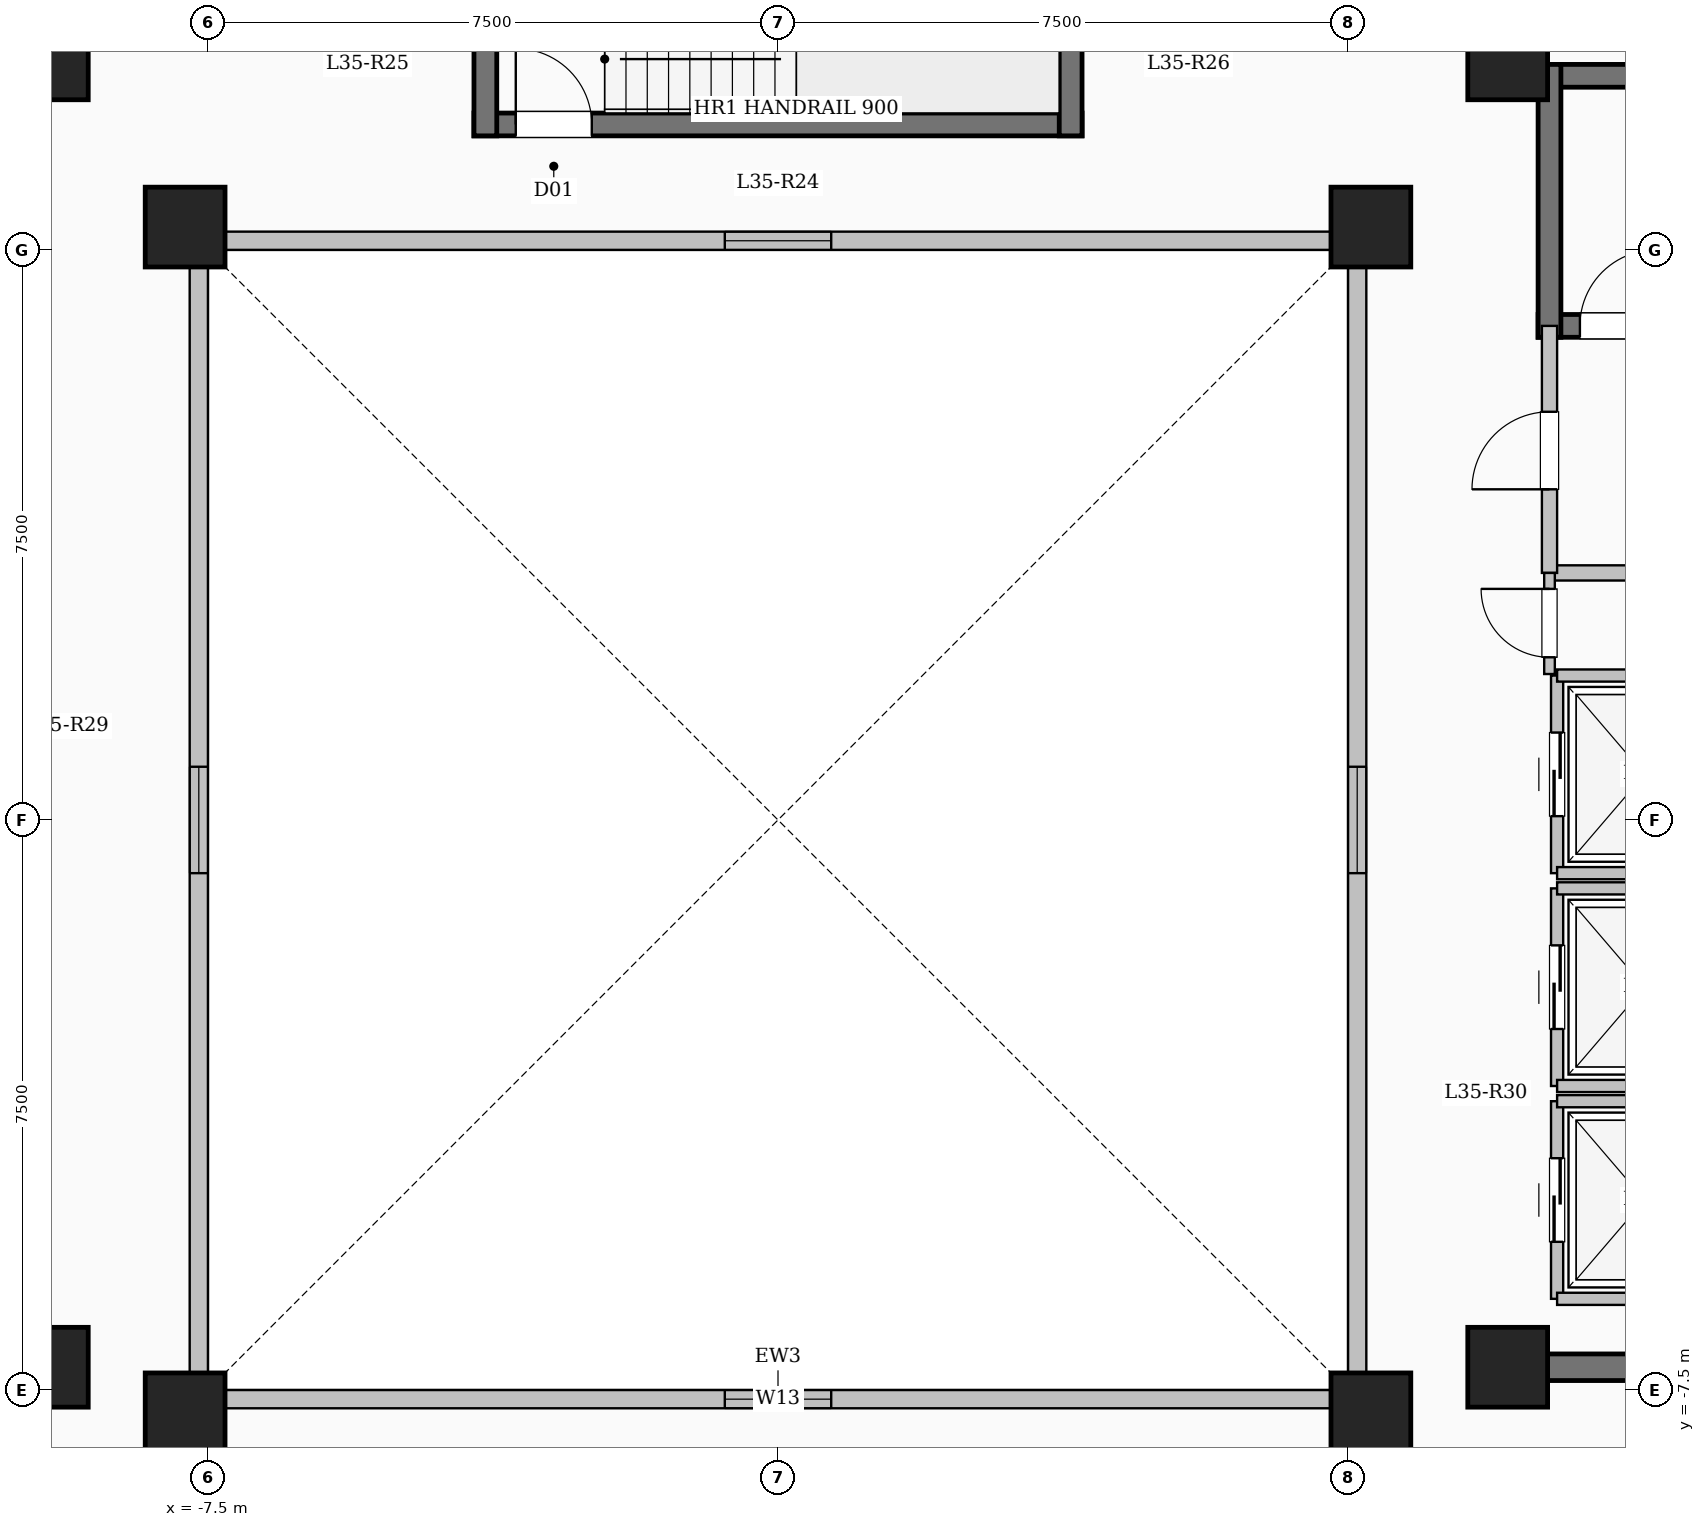
"""IFC4 building model, lengths in metres.
Left out: names, types, materials, properties, quantities, classifications, styles, units other than length and angle.
Written with IfcOpenShell. Run it as: python <this file> out.ifc"""

import sys

from ifc_helpers import new_model, si_unit, direction, frame, frame_2d, origin, origin_2d, place, context, subcontext, project, spatial, rectangle, extrude, element, fill, save


model = new_model("IFC4")
c1 = context("Model", 3, precision=1e-05, world=origin(), true_north=direction((0.0, 1.0)))
c2 = subcontext(c1, "Body", "Model", "MODEL_VIEW")
j1 = project(units=[si_unit("LENGTHUNIT", "METRE"), si_unit("PLANEANGLEUNIT", "RADIAN")], contexts=[c1])
p1 = place(None, origin())
s1 = spatial("IfcSite", under=j1, at=p1, CompositionType="ELEMENT")
p2 = place(p1, origin())
s2 = spatial("IfcBuilding", under=s1, at=p2, CompositionType="ELEMENT")
p3 = place(p2, frame((0.0, 0.0, 132.6)))
s3 = spatial("IfcBuildingStorey", under=s2, at=p3, CompositionType="ELEMENT", Elevation=132.6)
for number, where, z_axis, x_axis in (
    (1, (-7.8, -7.8, 0.0), (0.0, 0.0, 1.0), (1.0, 0.0, 0.0)),
    (2, (7.8, -7.8, 0.0), (0.0, 0.0, 1.0), (1.0, 0.0, 0.0)),
    (3, (-7.8, 7.8, 0.0), (0.0, 0.0, 1.0), (1.0, 0.0, 0.0)),
    (4, (7.8, 7.8, 0.0), (0.0, 0.0, 1.0), (1.0, 0.0, 0.0)),
    (5, (-9.6, -7.2, 0.0), (0.0, 0.0, 1.0), (1.0, 0.0, 0.0)),
    (6, (-9.6, 10.0, 0.0), (0.0, 0.0, 1.0), (1.0, 0.0, 0.0)),
    (7, (9.6, -7.2, 0.0), (0.0, 0.0, 1.0), (1.0, 0.0, 0.0)),
    (8, (9.6, 10.0, 0.0), (0.0, 0.0, 1.0), (1.0, 0.0, 0.0)),
):
    element("IfcColumn", number, at=place(p3, frame(where, z_axis=z_axis, x_axis=x_axis)), inside=s3, PredefinedType="COLUMN", context=c2, shape_type="SweptSolid", body=[
        extrude(rectangle(XDim=1.05, YDim=1.05, at=origin_2d()), origin(), (0.0, 0.0, 1.0), 3.35),
    ])
p4 = place(p3, frame((-7.62, -7.62, 0.0), z_axis=(0.0, 0.0, 1.0), x_axis=(1.0, 0.0, 0.0)))
e9 = element("IfcWall", 9, at=p4, inside=s3, PredefinedType="SOLIDWALL", context=c2, shape_type="SweptSolid", body=[
    extrude(rectangle(XDim=15.24, YDim=0.24, at=frame_2d((7.62, 0.0))), origin(), (0.0, 0.0, 1.0), 3.1),
])
p5 = place(p4, frame((6.92, 0.0, 0.95)))
e10 = element("IfcOpeningElement", 10, at=p5, cuts=e9, PredefinedType="OPENING", context=c2, shape_type="SweptSolid", body=[
    extrude(rectangle(XDim=1.4, YDim=1.5, at=frame_2d((0.7, 0.75))), frame((0.0, 0.13, 0.0), z_axis=(0.0, -1.0, 0.0), x_axis=(1.0, 0.0, 0.0)), (0.0, 0.0, 1.0), 0.26),
])
p6 = place(p3, frame((7.62, -7.62, 0.0), z_axis=(0.0, 0.0, 1.0), x_axis=(0.0, 1.0, 0.0)))
e11 = element("IfcWall", 11, at=p6, inside=s3, PredefinedType="SOLIDWALL", context=c2, shape_type="SweptSolid", body=[
    extrude(rectangle(XDim=15.24, YDim=0.24, at=frame_2d((7.62, 0.0))), origin(), (0.0, 0.0, 1.0), 3.1),
])
p7 = place(p6, frame((6.92, 0.0, 0.95)))
e12 = element("IfcOpeningElement", 12, at=p7, cuts=e11, PredefinedType="OPENING", context=c2, shape_type="SweptSolid", body=[
    extrude(rectangle(XDim=1.4, YDim=1.5, at=frame_2d((0.7, 0.75))), frame((0.0, 0.13, 0.0), z_axis=(0.0, -1.0, 0.0), x_axis=(1.0, 0.0, 0.0)), (0.0, 0.0, 1.0), 0.26),
])
p8 = place(p3, frame((7.62, 7.62, 0.0), z_axis=(0.0, 0.0, 1.0), x_axis=(-1.0, 0.0, 0.0)))
e13 = element("IfcWall", 13, at=p8, inside=s3, PredefinedType="SOLIDWALL", context=c2, shape_type="SweptSolid", body=[
    extrude(rectangle(XDim=15.24, YDim=0.24, at=frame_2d((7.62, 0.0))), origin(), (0.0, 0.0, 1.0), 3.1),
])
p9 = place(p8, frame((6.92, 0.0, 0.95)))
e14 = element("IfcOpeningElement", 14, at=p9, cuts=e13, PredefinedType="OPENING", context=c2, shape_type="SweptSolid", body=[
    extrude(rectangle(XDim=1.4, YDim=1.5, at=frame_2d((0.7, 0.75))), frame((0.0, 0.13, 0.0), z_axis=(0.0, -1.0, 0.0), x_axis=(1.0, 0.0, 0.0)), (0.0, 0.0, 1.0), 0.26),
])
p10 = place(p3, frame((-7.62, 7.62, 0.0), z_axis=(0.0, 0.0, 1.0), x_axis=(0.0, -1.0, 0.0)))
e15 = element("IfcWall", 15, at=p10, inside=s3, PredefinedType="SOLIDWALL", context=c2, shape_type="SweptSolid", body=[
    extrude(rectangle(XDim=15.24, YDim=0.24, at=frame_2d((7.62, 0.0))), origin(), (0.0, 0.0, 1.0), 3.1),
])
p11 = place(p10, frame((6.92, 0.0, 0.95)))
e16 = element("IfcOpeningElement", 16, at=p11, cuts=e15, PredefinedType="OPENING", context=c2, shape_type="SweptSolid", body=[
    extrude(rectangle(XDim=1.4, YDim=1.5, at=frame_2d((0.7, 0.75))), frame((0.0, 0.13, 0.0), z_axis=(0.0, -1.0, 0.0), x_axis=(1.0, 0.0, 0.0)), (0.0, 0.0, 1.0), 0.26),
])
p12 = place(p3, frame((10.0, 9.79, 0.0), z_axis=(0.0, 0.0, 1.0), x_axis=(1.0, 0.0, 0.0)))
e17 = element("IfcWall", 17, at=p12, inside=s3, PredefinedType="SHEAR", context=c2, shape_type="SweptSolid", body=[
    extrude(rectangle(XDim=8.0, YDim=0.3, at=frame_2d((4.0, 0.0))), origin(), (0.0, 0.0, 1.0), 3.35),
])
p13 = place(p3, frame((10.0, 6.5, 0.0), z_axis=(0.0, 0.0, 1.0), x_axis=(1.0, 0.0, 0.0)))
e18 = element("IfcWall", 18, at=p13, inside=s3, PredefinedType="SHEAR", context=c2, shape_type="SweptSolid", body=[
    extrude(rectangle(XDim=8.0, YDim=0.3, at=frame_2d((4.0, 0.0))), origin(), (0.0, 0.0, 1.0), 3.35),
])
p14 = place(p13, frame((0.55, 0.0, 0.0)))
e19 = element("IfcOpeningElement", 19, at=p14, cuts=e18, PredefinedType="OPENING", context=c2, shape_type="SweptSolid", body=[
    extrude(rectangle(XDim=1.0, YDim=2.15, at=frame_2d((0.5, 1.075))), frame((0.0, 0.16, 0.0), z_axis=(0.0, -1.0, 0.0), x_axis=(1.0, 0.0, 0.0)), (0.0, 0.0, 1.0), 0.32),
])
p15 = place(p3, frame((10.15, 6.35, 0.0), z_axis=(0.0, 0.0, 1.0), x_axis=(0.0, 1.0, 0.0)))
e20 = element("IfcWall", 20, at=p15, inside=s3, PredefinedType="SHEAR", context=c2, shape_type="SweptSolid", body=[
    extrude(rectangle(XDim=3.59, YDim=0.3, at=frame_2d((1.795, 0.0))), origin(), (0.0, 0.0, 1.0), 3.35),
])
p16 = place(p3, frame((-4.0, 9.15, 0.0), z_axis=(0.0, 0.0, 1.0), x_axis=(1.0, 0.0, 0.0)))
e21 = element("IfcWall", 21, at=p16, inside=s3, PredefinedType="SHEAR", context=c2, shape_type="SweptSolid", body=[
    extrude(rectangle(XDim=8.0, YDim=0.3, at=frame_2d((4.0, 0.0))), origin(), (0.0, 0.0, 1.0), 3.35),
])
p17 = place(p16, frame((0.55, 0.0, 0.0)))
e22 = element("IfcOpeningElement", 22, at=p17, cuts=e21, PredefinedType="OPENING", context=c2, shape_type="SweptSolid", body=[
    extrude(rectangle(XDim=1.0, YDim=2.15, at=frame_2d((0.5, 1.075))), frame((0.0, 0.16, 0.0), z_axis=(0.0, -1.0, 0.0), x_axis=(1.0, 0.0, 0.0)), (0.0, 0.0, 1.0), 0.32),
])
for number, where, z_axis, x_axis in (
    (23, (-3.85, 9.0, 0.0), (0.0, 0.0, 1.0), (0.0, 1.0, 0.0)),
    (24, (3.85, 9.0, 0.0), (0.0, 0.0, 1.0), (0.0, 1.0, 0.0)),
):
    element("IfcWall", number, at=place(p3, frame(where, z_axis=z_axis, x_axis=x_axis)), inside=s3, PredefinedType="SHEAR", context=c2, shape_type="SweptSolid", body=[
        extrude(rectangle(XDim=3.59, YDim=0.3, at=frame_2d((1.795, 0.0))), origin(), (0.0, 0.0, 1.0), 3.35),
    ])
p18 = place(p3, frame((10.15, 3.25, 0.0), z_axis=(0.0, 0.0, 1.0), x_axis=(1.0, 0.0, 0.0)))
e25 = element("IfcWall", 25, at=p18, inside=s3, PredefinedType="SOLIDWALL", context=c2, shape_type="SweptSolid", body=[
    extrude(rectangle(XDim=5.4, YDim=0.2, at=frame_2d((2.7, 0.0))), origin(), (0.0, 0.0, 1.0), 3.1),
])
p19 = place(p3, frame((10.15, 3.25, 0.0), z_axis=(0.0, 0.0, 1.0), x_axis=(0.0, 1.0, 0.0)))
e26 = element("IfcWall", 26, at=p19, inside=s3, PredefinedType="SOLIDWALL", context=c2, shape_type="SweptSolid", body=[
    extrude(rectangle(XDim=3.25, YDim=0.2, at=frame_2d((1.625, 0.0))), origin(), (0.0, 0.0, 1.0), 3.1),
])
p20 = place(p19, frame((1.1, 0.0, 0.0)))
e27 = element("IfcOpeningElement", 27, at=p20, cuts=e26, PredefinedType="OPENING", context=c2, shape_type="SweptSolid", body=[
    extrude(rectangle(XDim=1.02, YDim=2.15, at=frame_2d((0.51, 1.075))), frame((0.0, 0.11, 0.0), z_axis=(0.0, -1.0, 0.0), x_axis=(1.0, 0.0, 0.0)), (0.0, 0.0, 1.0), 0.22),
])
p21 = place(p3, frame((10.25, -6.3, 0.0), z_axis=(0.0, 0.0, 1.0), x_axis=(0.0, 1.0, 0.0)))
e28 = element("IfcWall", 28, at=p21, inside=s3, PredefinedType="SOLIDWALL", context=c2, shape_type="SweptSolid", body=[
    extrude(rectangle(XDim=2.6, YDim=0.16, at=frame_2d((1.3, 0.0))), origin(), (0.0, 0.0, 1.0), 3.1),
])
p22 = place(p21, frame((0.75, 0.0, 0.0)))
e29 = element("IfcOpeningElement", 29, at=p22, cuts=e28, PredefinedType="OPENING", context=c2, shape_type="SweptSolid", body=[
    extrude(rectangle(XDim=1.1, YDim=2.15, at=frame_2d((0.55, 1.075))), frame((0.0, 0.09, 0.0), z_axis=(0.0, -1.0, 0.0), x_axis=(1.0, 0.0, 0.0)), (0.0, 0.0, 1.0), 0.18),
])
for number, where, z_axis, x_axis in (
    (30, (10.25, -6.3, 0.0), (0.0, 0.0, 1.0), (1.0, 0.0, 0.0)),
    (31, (10.25, -3.7, 0.0), (0.0, 0.0, 1.0), (1.0, 0.0, 0.0)),
):
    element("IfcWall", number, at=place(p3, frame(where, z_axis=z_axis, x_axis=x_axis)), inside=s3, PredefinedType="SOLIDWALL", context=c2, shape_type="SweptSolid", body=[
        extrude(rectangle(XDim=2.3, YDim=0.16, at=frame_2d((1.15, 0.0))), origin(), (0.0, 0.0, 1.0), 3.1),
    ])
p23 = place(p3, frame((10.25, -3.5, 0.0), z_axis=(0.0, 0.0, 1.0), x_axis=(0.0, 1.0, 0.0)))
e32 = element("IfcWall", 32, at=p23, inside=s3, PredefinedType="SOLIDWALL", context=c2, shape_type="SweptSolid", body=[
    extrude(rectangle(XDim=2.6, YDim=0.16, at=frame_2d((1.3, 0.0))), origin(), (0.0, 0.0, 1.0), 3.1),
])
p24 = place(p23, frame((0.75, 0.0, 0.0)))
e33 = element("IfcOpeningElement", 33, at=p24, cuts=e32, PredefinedType="OPENING", context=c2, shape_type="SweptSolid", body=[
    extrude(rectangle(XDim=1.1, YDim=2.15, at=frame_2d((0.55, 1.075))), frame((0.0, 0.09, 0.0), z_axis=(0.0, -1.0, 0.0), x_axis=(1.0, 0.0, 0.0)), (0.0, 0.0, 1.0), 0.18),
])
for number, where, z_axis, x_axis in (
    (34, (10.25, -3.5, 0.0), (0.0, 0.0, 1.0), (1.0, 0.0, 0.0)),
    (35, (10.25, -0.9, 0.0), (0.0, 0.0, 1.0), (1.0, 0.0, 0.0)),
):
    element("IfcWall", number, at=place(p3, frame(where, z_axis=z_axis, x_axis=x_axis)), inside=s3, PredefinedType="SOLIDWALL", context=c2, shape_type="SweptSolid", body=[
        extrude(rectangle(XDim=2.3, YDim=0.16, at=frame_2d((1.15, 0.0))), origin(), (0.0, 0.0, 1.0), 3.1),
    ])
p25 = place(p3, frame((10.25, -0.7, 0.0), z_axis=(0.0, 0.0, 1.0), x_axis=(0.0, 1.0, 0.0)))
e36 = element("IfcWall", 36, at=p25, inside=s3, PredefinedType="SOLIDWALL", context=c2, shape_type="SweptSolid", body=[
    extrude(rectangle(XDim=2.6, YDim=0.16, at=frame_2d((1.3, 0.0))), origin(), (0.0, 0.0, 1.0), 3.1),
])
p26 = place(p25, frame((0.75, 0.0, 0.0)))
e37 = element("IfcOpeningElement", 37, at=p26, cuts=e36, PredefinedType="OPENING", context=c2, shape_type="SweptSolid", body=[
    extrude(rectangle(XDim=1.1, YDim=2.15, at=frame_2d((0.55, 1.075))), frame((0.0, 0.09, 0.0), z_axis=(0.0, -1.0, 0.0), x_axis=(1.0, 0.0, 0.0)), (0.0, 0.0, 1.0), 0.18),
])
for number, where, z_axis, x_axis in (
    (38, (10.25, -0.7, 0.0), (0.0, 0.0, 1.0), (1.0, 0.0, 0.0)),
    (39, (10.25, 1.9, 0.0), (0.0, 0.0, 1.0), (1.0, 0.0, 0.0)),
):
    element("IfcWall", number, at=place(p3, frame(where, z_axis=z_axis, x_axis=x_axis)), inside=s3, PredefinedType="SOLIDWALL", context=c2, shape_type="SweptSolid", body=[
        extrude(rectangle(XDim=2.3, YDim=0.16, at=frame_2d((1.15, 0.0))), origin(), (0.0, 0.0, 1.0), 3.1),
    ])
p27 = place(p3, frame((10.075, -7.2, 0.0), z_axis=(0.0, 0.0, 1.0), x_axis=(1.0, 0.0, 0.0)))
e40 = element("IfcWall", 40, at=p27, inside=s3, PredefinedType="SHEAR", context=c2, shape_type="SweptSolid", body=[
    extrude(rectangle(XDim=8.55, YDim=0.35, at=frame_2d((4.275, 0.0))), origin(), (0.0, 0.0, 1.0), 3.35),
])
p28 = place(p3, frame((10.15, 1.92, 0.0), z_axis=(0.0, 0.0, 1.0), x_axis=(0.0, 1.0, 0.0)))
e41 = element("IfcWall", 41, at=p28, inside=s3, PredefinedType="PARTITIONING", context=c2, shape_type="SweptSolid", body=[
    extrude(rectangle(XDim=1.33, YDim=0.14, at=frame_2d((0.665, 0.0))), origin(), (0.0, 0.0, 1.0), 3.1),
])
p29 = place(p28, frame((0.22, 0.0, 0.0)))
e42 = element("IfcOpeningElement", 42, at=p29, cuts=e41, PredefinedType="OPENING", context=c2, shape_type="SweptSolid", body=[
    extrude(rectangle(XDim=0.9, YDim=2.08, at=frame_2d((0.45, 1.04))), frame((0.0, 0.08, 0.0), z_axis=(0.0, -1.0, 0.0), x_axis=(1.0, 0.0, 0.0)), (0.0, 0.0, 1.0), 0.16),
])
p30 = place(p5, origin())
e43 = element("IfcWindow", 43, at=p30, inside=s3, PartitioningType="SINGLE_PANEL", PredefinedType="WINDOW", context=c2, shape_type="SweptSolid", body=[
    extrude(rectangle(XDim=1.4, YDim=1.5, at=frame_2d((0.7, 0.75))), frame((0.0, 0.03, 0.0), z_axis=(0.0, -1.0, 0.0), x_axis=(1.0, 0.0, 0.0)), (0.0, 0.0, 1.0), 0.06),
])
fill(e10, e43)
p31 = place(p7, origin())
e44 = element("IfcWindow", 44, at=p31, inside=s3, PartitioningType="SINGLE_PANEL", PredefinedType="WINDOW", context=c2, shape_type="SweptSolid", body=[
    extrude(rectangle(XDim=1.4, YDim=1.5, at=frame_2d((0.7, 0.75))), frame((0.0, 0.03, 0.0), z_axis=(0.0, -1.0, 0.0), x_axis=(1.0, 0.0, 0.0)), (0.0, 0.0, 1.0), 0.06),
])
fill(e12, e44)
p32 = place(p9, origin())
e45 = element("IfcWindow", 45, at=p32, inside=s3, PartitioningType="SINGLE_PANEL", PredefinedType="WINDOW", context=c2, shape_type="SweptSolid", body=[
    extrude(rectangle(XDim=1.4, YDim=1.5, at=frame_2d((0.7, 0.75))), frame((0.0, 0.03, 0.0), z_axis=(0.0, -1.0, 0.0), x_axis=(1.0, 0.0, 0.0)), (0.0, 0.0, 1.0), 0.06),
])
fill(e14, e45)
p33 = place(p11, origin())
e46 = element("IfcWindow", 46, at=p33, inside=s3, PartitioningType="SINGLE_PANEL", PredefinedType="WINDOW", context=c2, shape_type="SweptSolid", body=[
    extrude(rectangle(XDim=1.4, YDim=1.5, at=frame_2d((0.7, 0.75))), frame((0.0, 0.03, 0.0), z_axis=(0.0, -1.0, 0.0), x_axis=(1.0, 0.0, 0.0)), (0.0, 0.0, 1.0), 0.06),
])
fill(e16, e46)
p34 = place(p14, origin())
e47 = element("IfcDoor", 47, at=p34, inside=s3, OperationType="SINGLE_SWING_RIGHT", PredefinedType="DOOR", context=c2, shape_type="SweptSolid", body=[
    extrude(rectangle(XDim=1.0, YDim=2.15, at=frame_2d((0.5, 1.075))), frame((0.0, 0.025, 0.0), z_axis=(0.0, -1.0, 0.0), x_axis=(1.0, 0.0, 0.0)), (0.0, 0.0, 1.0), 0.05),
])
fill(e19, e47)
p35 = place(p17, origin())
e48 = element("IfcDoor", 48, at=p35, inside=s3, OperationType="SINGLE_SWING_LEFT", PredefinedType="DOOR", context=c2, shape_type="SweptSolid", body=[
    extrude(rectangle(XDim=1.0, YDim=2.15, at=frame_2d((0.5, 1.075))), frame((0.0, 0.025, 0.0), z_axis=(0.0, -1.0, 0.0), x_axis=(1.0, 0.0, 0.0)), (0.0, 0.0, 1.0), 0.05),
])
fill(e22, e48)
p36 = place(p20, origin())
e49 = element("IfcDoor", 49, at=p36, inside=s3, OperationType="SINGLE_SWING_LEFT", PredefinedType="DOOR", context=c2, shape_type="SweptSolid", body=[
    extrude(rectangle(XDim=1.02, YDim=2.15, at=frame_2d((0.51, 1.075))), frame((0.0, 0.025, 0.0), z_axis=(0.0, -1.0, 0.0), x_axis=(1.0, 0.0, 0.0)), (0.0, 0.0, 1.0), 0.05),
])
fill(e27, e49)
p37 = place(p22, origin())
e50 = element("IfcDoor", 50, at=p37, inside=s3, OperationType="SLIDING_TO_LEFT", PredefinedType="DOOR", context=c2, shape_type="SweptSolid", body=[
    extrude(rectangle(XDim=1.1, YDim=2.15, at=frame_2d((0.55, 1.075))), frame((0.0, 0.025, 0.0), z_axis=(0.0, -1.0, 0.0), x_axis=(1.0, 0.0, 0.0)), (0.0, 0.0, 1.0), 0.05),
])
fill(e29, e50)
p38 = place(p24, origin())
e51 = element("IfcDoor", 51, at=p38, inside=s3, OperationType="SLIDING_TO_LEFT", PredefinedType="DOOR", context=c2, shape_type="SweptSolid", body=[
    extrude(rectangle(XDim=1.1, YDim=2.15, at=frame_2d((0.55, 1.075))), frame((0.0, 0.025, 0.0), z_axis=(0.0, -1.0, 0.0), x_axis=(1.0, 0.0, 0.0)), (0.0, 0.0, 1.0), 0.05),
])
fill(e33, e51)
p39 = place(p26, origin())
e52 = element("IfcDoor", 52, at=p39, inside=s3, OperationType="SLIDING_TO_LEFT", PredefinedType="DOOR", context=c2, shape_type="SweptSolid", body=[
    extrude(rectangle(XDim=1.1, YDim=2.15, at=frame_2d((0.55, 1.075))), frame((0.0, 0.025, 0.0), z_axis=(0.0, -1.0, 0.0), x_axis=(1.0, 0.0, 0.0)), (0.0, 0.0, 1.0), 0.05),
])
fill(e37, e52)
p40 = place(p29, origin())
e53 = element("IfcDoor", 53, at=p40, inside=s3, OperationType="SINGLE_SWING_RIGHT", PredefinedType="DOOR", context=c2, shape_type="SweptSolid", body=[
    extrude(rectangle(XDim=0.9, YDim=2.08, at=frame_2d((0.45, 1.04))), frame((0.0, 0.025, 0.0), z_axis=(0.0, -1.0, 0.0), x_axis=(1.0, 0.0, 0.0)), (0.0, 0.0, 1.0), 0.05),
])
fill(e42, e53)
save(model, sys.argv[1])
